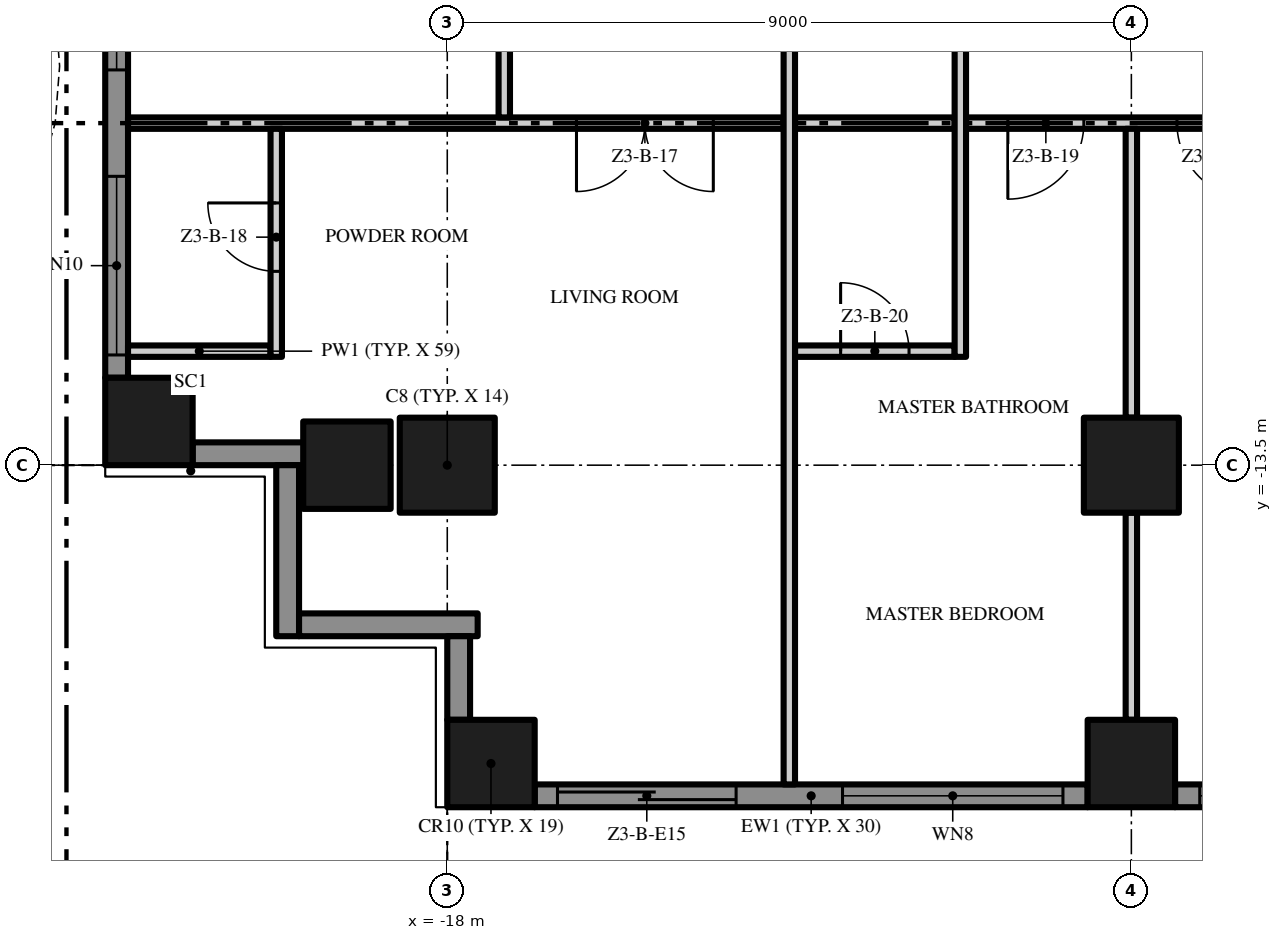
"""IFC4 building model, lengths in metres.
Left out: names, types, materials, properties, quantities, classifications, styles, units other than length and angle.
Written with IfcOpenShell. Run it as: python <this file> out.ifc"""

import sys

from ifc_helpers import new_model, si_unit, direction, frame, frame_2d, origin, origin_2d, place, context, subcontext, project, spatial, polyline, rectangle, outline, extrude, element, fill, save


model = new_model("IFC4")
c1 = context("Model", 3, precision=1e-05, world=origin(), true_north=direction((0.0, 1.0)))
c2 = subcontext(c1, "Body", "Model", "MODEL_VIEW")
j1 = project(units=[si_unit("LENGTHUNIT", "METRE"), si_unit("PLANEANGLEUNIT", "RADIAN")], contexts=[c1])
p1 = place(None, origin())
s1 = spatial("IfcSite", under=j1, at=p1, CompositionType="ELEMENT")
p2 = place(p1, origin())
s2 = spatial("IfcBuilding", under=s1, at=p2, CompositionType="ELEMENT")
p3 = place(p2, frame((0.0, 0.0, 144.0)))
s3 = spatial("IfcBuildingStorey", under=s2, at=p3, CompositionType="ELEMENT", Elevation=144.0)
p4 = place(p3, frame((-18.0, -13.5, 0.0), z_axis=(0.0, 0.0, 1.0), x_axis=(1.0, 0.0, 0.0)))
e1 = element("IfcColumn", 1, at=p4, inside=s3, PredefinedType="COLUMN", context=c2, shape_type="SweptSolid", body=[
    extrude(rectangle(XDim=1.25, YDim=1.25, at=origin_2d()), origin(), (0.0, 0.0, 1.0), 3.5),
])
for number, where, z_axis, x_axis in (
    (2, (-17.425, -17.425, 0.0), (0.0, 0.0, 1.0), (1.0, 0.0, 0.0)),
    (3, (-21.925, -12.925, 0.0), (0.0, 0.0, 1.0), (1.0, 0.0, 0.0)),
    (4, (-19.32, -13.5, 0.0), (0.0, 0.0, 1.0), (1.0, 0.0, 0.0)),
):
    element("IfcColumn", number, at=place(p3, frame(where, z_axis=z_axis, x_axis=x_axis)), inside=s3, PredefinedType="COLUMN", context=c2, shape_type="SweptSolid", body=[
        extrude(rectangle(XDim=1.15, YDim=1.15, at=origin_2d()), origin(), (0.0, 0.0, 1.0), 3.5),
    ])
p5 = place(p3, frame((-9.0, -13.5, 0.0), z_axis=(0.0, 0.0, 1.0), x_axis=(1.0, 0.0, 0.0)))
e5 = element("IfcColumn", 5, at=p5, inside=s3, PredefinedType="COLUMN", context=c2, shape_type="SweptSolid", body=[
    extrude(rectangle(XDim=1.25, YDim=1.25, at=origin_2d()), origin(), (0.0, 0.0, 1.0), 3.5),
])
p6 = place(p3, frame((-9.0, -17.425, 0.0), z_axis=(0.0, 0.0, 1.0), x_axis=(1.0, 0.0, 0.0)))
e6 = element("IfcColumn", 6, at=p6, inside=s3, PredefinedType="COLUMN", context=c2, shape_type="SweptSolid", body=[
    extrude(rectangle(XDim=1.15, YDim=1.15, at=origin_2d()), origin(), (0.0, 0.0, 1.0), 3.5),
])
p7 = place(p3, frame((-9.575, -17.85, 0.0), z_axis=(0.0, 0.0, 1.0), x_axis=(-1.0, 0.0, 0.0)))
e7 = element("IfcWall", 7, at=p7, inside=s3, PredefinedType="SOLIDWALL", context=c2, shape_type="SweptSolid", body=[
    extrude(rectangle(XDim=7.275, YDim=0.3, at=frame_2d((3.638, 0.0))), origin(), (0.0, 0.0, 1.0), 3.5),
])
p8 = place(p7, frame((4.625, 0.0, 0.0)))
e8 = element("IfcOpeningElement", 8, at=p8, cuts=e7, PredefinedType="OPENING", context=c2, shape_type="SweptSolid", body=[
    extrude(rectangle(XDim=2.35, YDim=2.4, at=frame_2d((1.175, 1.2))), frame((0.0, 0.16, 0.0), z_axis=(0.0, -1.0, 0.0), x_axis=(1.0, 0.0, 0.0)), (0.0, 0.0, 1.0), 0.32),
])
p9 = place(p7, frame((0.325, 0.0, 0.45)))
e9 = element("IfcOpeningElement", 9, at=p9, cuts=e7, PredefinedType="OPENING", context=c2, shape_type="SweptSolid", body=[
    extrude(rectangle(XDim=2.9, YDim=2.65, at=frame_2d((1.45, 1.325))), frame((0.0, 0.16, 0.0), z_axis=(0.0, -1.0, 0.0), x_axis=(1.0, 0.0, 0.0)), (0.0, 0.0, 1.0), 0.32),
])
p10 = place(p3, frame((-0.575, -17.85, 0.0), z_axis=(0.0, 0.0, 1.0), x_axis=(-1.0, 0.0, 0.0)))
e10 = element("IfcWall", 10, at=p10, inside=s3, PredefinedType="SOLIDWALL", context=c2, shape_type="SweptSolid", body=[
    extrude(rectangle(XDim=7.85, YDim=0.3, at=frame_2d((3.925, 0.0))), origin(), (0.0, 0.0, 1.0), 3.5),
])
p11 = place(p10, frame((4.625, 0.0, 0.45)))
e11 = element("IfcOpeningElement", 11, at=p11, cuts=e10, PredefinedType="OPENING", context=c2, shape_type="SweptSolid", body=[
    extrude(rectangle(XDim=2.9, YDim=2.65, at=frame_2d((1.45, 1.325))), frame((0.0, 0.16, 0.0), z_axis=(0.0, -1.0, 0.0), x_axis=(1.0, 0.0, 0.0)), (0.0, 0.0, 1.0), 0.32),
])
p12 = place(p10, frame((0.325, 0.0, 0.45)))
e12 = element("IfcOpeningElement", 12, at=p12, cuts=e10, PredefinedType="OPENING", context=c2, shape_type="SweptSolid", body=[
    extrude(rectangle(XDim=2.9, YDim=2.65, at=frame_2d((1.45, 1.325))), frame((0.0, 0.16, 0.0), z_axis=(0.0, -1.0, 0.0), x_axis=(1.0, 0.0, 0.0)), (0.0, 0.0, 1.0), 0.32),
])
p13 = place(p3, frame((-22.35, -12.35, 0.0), z_axis=(0.0, 0.0, 1.0), x_axis=(0.0, 1.0, 0.0)))
e13 = element("IfcWall", 13, at=p13, inside=s3, PredefinedType="SOLIDWALL", context=c2, shape_type="SweptSolid", body=[
    extrude(rectangle(XDim=7.275, YDim=0.3, at=frame_2d((3.638, 0.0))), origin(), (0.0, 0.0, 1.0), 3.5),
])
p14 = place(p13, frame((4.05, 0.0, 0.45)))
e14 = element("IfcOpeningElement", 14, at=p14, cuts=e13, PredefinedType="OPENING", context=c2, shape_type="SweptSolid", body=[
    extrude(rectangle(XDim=2.9, YDim=2.65, at=frame_2d((1.45, 1.325))), frame((0.0, 0.16, 0.0), z_axis=(0.0, -1.0, 0.0), x_axis=(1.0, 0.0, 0.0)), (0.0, 0.0, 1.0), 0.32),
])
p15 = place(p13, frame((0.3, 0.0, 0.45)))
e15 = element("IfcOpeningElement", 15, at=p15, cuts=e13, PredefinedType="OPENING", context=c2, shape_type="SweptSolid", body=[
    extrude(rectangle(XDim=2.35, YDim=2.65, at=frame_2d((1.175, 1.325))), frame((0.0, 0.16, 0.0), z_axis=(0.0, -1.0, 0.0), x_axis=(1.0, 0.0, 0.0)), (0.0, 0.0, 1.0), 0.32),
])
p16 = place(p3, frame((-19.85, -13.35, 0.0), z_axis=(0.0, 0.0, 1.0), x_axis=(-1.0, 0.0, 0.0)))
e16 = element("IfcWall", 16, at=p16, inside=s3, PredefinedType="SOLIDWALL", context=c2, shape_type="SweptSolid", body=[
    extrude(rectangle(XDim=1.5, YDim=0.3, at=frame_2d((0.75, 0.0))), origin(), (0.0, 0.0, 1.0), 3.5),
])
p17 = place(p3, frame((-20.1, -15.75, 0.0), z_axis=(0.0, 0.0, 1.0), x_axis=(0.0, 1.0, 0.0)))
e17 = element("IfcWall", 17, at=p17, inside=s3, PredefinedType="SOLIDWALL", context=c2, shape_type="SweptSolid", body=[
    extrude(rectangle(XDim=2.25, YDim=0.3, at=frame_2d((1.125, 0.0))), origin(), (0.0, 0.0, 1.0), 3.5),
])
p18 = place(p3, frame((-17.6, -15.6, 0.0), z_axis=(0.0, 0.0, 1.0), x_axis=(-1.0, 0.0, 0.0)))
e18 = element("IfcWall", 18, at=p18, inside=s3, PredefinedType="SOLIDWALL", context=c2, shape_type="SweptSolid", body=[
    extrude(rectangle(XDim=2.35, YDim=0.3, at=frame_2d((1.175, 0.0))), origin(), (0.0, 0.0, 1.0), 3.5),
])
p19 = place(p3, frame((-17.85, -16.85, 0.0), z_axis=(0.0, 0.0, 1.0), x_axis=(0.0, 1.0, 0.0)))
e19 = element("IfcWall", 19, at=p19, inside=s3, PredefinedType="SOLIDWALL", context=c2, shape_type="SweptSolid", body=[
    extrude(rectangle(XDim=1.1, YDim=0.3, at=frame_2d((0.55, 0.0))), origin(), (0.0, 0.0, 1.0), 3.5),
])
p20 = place(p3, origin())
e20 = element("IfcWall", 20, at=p20, inside=s3, PredefinedType="USERDEFINED", context=c2, shape_type="SweptSolid", body=[
    extrude(outline(polyline([(-18.0, -19.8), (-16.5, -20.505), (-15.0, -20.941), (-14.25, -21.0), (-13.5, -20.941), (-12.0, -20.505), (-10.5, -19.8), (-9.0, -19.095), (-7.5, -18.659), (-6.75, -18.6), (-6.0, -18.659), (-4.5, -19.095), (-3.0, -19.8), (-1.5, -20.505), (0.0, -20.941), (0.75, -21.0), (1.5, -20.941), (3.0, -20.505), (4.5, -19.8), (6.0, -19.095), (7.5, -18.659), (8.25, -18.6), (9.0, -18.659), (10.5, -19.095), (12.0, -19.8), (13.5, -20.505), (15.0, -20.941), (15.75, -21.0), (16.5, -20.941), (18.0, -20.505), (17.93, -20.265), (16.455, -20.694), (15.75, -20.749), (15.045, -20.694), (13.589, -20.271), (12.106, -19.574), (10.589, -18.86), (9.045, -18.411), (8.25, -18.349), (7.455, -18.411), (5.911, -18.86), (4.394, -19.574), (2.911, -20.271), (1.455, -20.694), (0.75, -20.749), (0.045, -20.694), (-1.411, -20.271), (-2.894, -19.574), (-4.411, -18.86), (-5.955, -18.411), (-6.75, -18.349), (-7.545, -18.411), (-9.089, -18.86), (-10.606, -19.574), (-12.089, -20.271), (-13.545, -20.694), (-14.25, -20.749), (-14.955, -20.694), (-16.411, -20.271), (-17.894, -19.574), (-18.0, -19.8)])), origin(), (0.0, 0.0, 1.0), 0.9),
])
p21 = place(p3, origin())
e21 = element("IfcWall", 21, at=p21, inside=s3, PredefinedType="USERDEFINED", context=c2, shape_type="SweptSolid", body=[
    extrude(outline(polyline([(-24.3, 18.0), (-25.005, 16.5), (-25.441, 15.0), (-25.5, 14.25), (-25.441, 13.5), (-25.005, 12.0), (-24.3, 10.5), (-23.595, 9.0), (-23.159, 7.5), (-23.1, 6.75), (-23.159, 6.0), (-23.595, 4.5), (-24.3, 3.0), (-25.005, 1.5), (-25.441, 0.0), (-25.5, -0.75), (-25.441, -1.5), (-25.005, -3.0), (-24.3, -4.5), (-23.595, -6.0), (-23.159, -7.5), (-23.1, -8.25), (-23.159, -9.0), (-23.595, -10.5), (-24.3, -12.0), (-25.005, -13.5), (-24.779, -13.606), (-24.074, -12.106), (-23.36, -10.589), (-22.911, -9.045), (-22.849, -8.25), (-22.911, -7.455), (-23.36, -5.911), (-24.074, -4.394), (-24.771, -2.911), (-25.194, -1.455), (-25.249, -0.75), (-25.194, -0.045), (-24.771, 1.411), (-24.074, 2.894), (-23.36, 4.411), (-22.911, 5.955), (-22.849, 6.75), (-22.911, 7.545), (-23.36, 9.089), (-24.074, 10.606), (-24.771, 12.089), (-25.194, 13.545), (-25.249, 14.25), (-25.194, 14.955), (-24.771, 16.411), (-24.074, 17.894), (-24.3, 18.0)])), origin(), (0.0, 0.0, 1.0), 0.9),
])
p22 = place(p3, frame((-22.2, -12.0, 0.0), z_axis=(0.0, 0.0, 1.0), x_axis=(1.0, 0.0, 0.0)))
e22 = element("IfcWall", 22, at=p22, inside=s3, PredefinedType="PARTITIONING", context=c2, shape_type="SweptSolid", body=[
    extrude(rectangle(XDim=1.875, YDim=0.15, at=frame_2d((0.938, 0.0))), origin(), (0.0, 0.0, 1.0), 3.5),
])
p23 = place(p3, frame((-13.425, -12.0, 0.0), z_axis=(0.0, 0.0, 1.0), x_axis=(1.0, 0.0, 0.0)))
e23 = element("IfcWall", 23, at=p23, inside=s3, PredefinedType="PARTITIONING", context=c2, shape_type="SweptSolid", body=[
    extrude(rectangle(XDim=2.1, YDim=0.15, at=frame_2d((1.05, 0.0))), origin(), (0.0, 0.0, 1.0), 3.5),
])
p24 = place(p23, frame((0.6, 0.0, 0.0)))
e24 = element("IfcOpeningElement", 24, at=p24, cuts=e23, PredefinedType="OPENING", context=c2, shape_type="SweptSolid", body=[
    extrude(rectangle(XDim=0.9, YDim=2.1, at=frame_2d((0.45, 1.05))), frame((0.0, 0.085, 0.0), z_axis=(0.0, -1.0, 0.0), x_axis=(1.0, 0.0, 0.0)), (0.0, 0.0, 1.0), 0.17),
])
p25 = place(p3, frame((-13.575, -9.0, 0.0), z_axis=(0.0, 0.0, 1.0), x_axis=(-1.0, 0.0, 0.0)))
e25 = element("IfcWall", 25, at=p25, inside=s3, PredefinedType="PARTITIONING", context=c2, shape_type="SweptSolid", body=[
    extrude(rectangle(XDim=8.625, YDim=0.15, at=frame_2d((4.312, 0.0))), origin(), (0.0, 0.0, 1.0), 3.5),
])
p26 = place(p25, frame((0.925, 0.0, 0.0)))
e26 = element("IfcOpeningElement", 26, at=p26, cuts=e25, PredefinedType="OPENING", context=c2, shape_type="SweptSolid", body=[
    extrude(rectangle(XDim=1.8, YDim=2.4, at=frame_2d((0.9, 1.2))), frame((0.0, 0.085, 0.0), z_axis=(0.0, -1.0, 0.0), x_axis=(1.0, 0.0, 0.0)), (0.0, 0.0, 1.0), 0.17),
])
p27 = place(p3, frame((-13.425, -9.0, 0.0), z_axis=(0.0, 0.0, 1.0), x_axis=(1.0, 0.0, 0.0)))
e27 = element("IfcWall", 27, at=p27, inside=s3, PredefinedType="PARTITIONING", context=c2, shape_type="SweptSolid", body=[
    extrude(rectangle(XDim=2.1, YDim=0.15, at=frame_2d((1.05, 0.0))), origin(), (0.0, 0.0, 1.0), 3.5),
])
p28 = place(p3, frame((-6.825, -9.0, 0.0), z_axis=(0.0, 0.0, 1.0), x_axis=(-1.0, 0.0, 0.0)))
e28 = element("IfcWall", 28, at=p28, inside=s3, PredefinedType="PARTITIONING", context=c2, shape_type="SweptSolid", body=[
    extrude(rectangle(XDim=4.35, YDim=0.15, at=frame_2d((2.175, 0.0))), origin(), (0.0, 0.0, 1.0), 3.5),
])
p29 = place(p28, frame((2.8, 0.0, 0.0)))
e29 = element("IfcOpeningElement", 29, at=p29, cuts=e28, PredefinedType="OPENING", context=c2, shape_type="SweptSolid", body=[
    extrude(rectangle(XDim=1.0, YDim=2.4, at=frame_2d((0.5, 1.2))), frame((0.0, 0.085, 0.0), z_axis=(0.0, -1.0, 0.0), x_axis=(1.0, 0.0, 0.0)), (0.0, 0.0, 1.0), 0.17),
])
p30 = place(p28, frame((0.575, 0.0, 0.0)))
e30 = element("IfcOpeningElement", 30, at=p30, cuts=e28, PredefinedType="OPENING", context=c2, shape_type="SweptSolid", body=[
    extrude(rectangle(XDim=1.0, YDim=2.4, at=frame_2d((0.5, 1.2))), frame((0.0, 0.085, 0.0), z_axis=(0.0, -1.0, 0.0), x_axis=(1.0, 0.0, 0.0)), (0.0, 0.0, 1.0), 0.17),
])
p31 = place(p3, frame((-20.25, -12.075, 0.0), z_axis=(0.0, 0.0, 1.0), x_axis=(0.0, 1.0, 0.0)))
e31 = element("IfcWall", 31, at=p31, inside=s3, PredefinedType="PARTITIONING", context=c2, shape_type="SweptSolid", body=[
    extrude(rectangle(XDim=3.0, YDim=0.15, at=frame_2d((1.5, 0.0))), origin(), (0.0, 0.0, 1.0), 3.5),
])
p32 = place(p31, frame((1.125, 0.0, 0.0)))
e32 = element("IfcOpeningElement", 32, at=p32, cuts=e31, PredefinedType="OPENING", context=c2, shape_type="SweptSolid", body=[
    extrude(rectangle(XDim=0.9, YDim=2.1, at=frame_2d((0.45, 1.05))), frame((0.0, 0.085, 0.0), z_axis=(0.0, -1.0, 0.0), x_axis=(1.0, 0.0, 0.0)), (0.0, 0.0, 1.0), 0.17),
])
p33 = place(p3, frame((-17.25, -8.925, 0.0), z_axis=(0.0, 0.0, 1.0), x_axis=(0.0, 1.0, 0.0)))
e33 = element("IfcWall", 33, at=p33, inside=s3, PredefinedType="PARTITIONING", context=c2, shape_type="SweptSolid", body=[
    extrude(rectangle(XDim=4.5, YDim=0.15, at=frame_2d((2.25, 0.0))), origin(), (0.0, 0.0, 1.0), 3.5),
])
p34 = place(p3, frame((-13.5, -4.425, 0.0), z_axis=(0.0, 0.0, 1.0), x_axis=(0.0, -1.0, 0.0)))
e34 = element("IfcWall", 34, at=p34, inside=s3, PredefinedType="PARTITIONING", context=c2, shape_type="SweptSolid", body=[
    extrude(rectangle(XDim=13.275, YDim=0.15, at=frame_2d((6.638, 0.0))), origin(), (0.0, 0.0, 1.0), 3.5),
])
p35 = place(p34, frame((1.875, 0.0, 0.0)))
e35 = element("IfcOpeningElement", 35, at=p35, cuts=e34, PredefinedType="OPENING", context=c2, shape_type="SweptSolid", body=[
    extrude(rectangle(XDim=0.9, YDim=2.1, at=frame_2d((0.45, 1.05))), frame((0.0, 0.085, 0.0), z_axis=(0.0, -1.0, 0.0), x_axis=(1.0, 0.0, 0.0)), (0.0, 0.0, 1.0), 0.17),
])
p36 = place(p3, frame((-11.25, -12.075, 0.0), z_axis=(0.0, 0.0, 1.0), x_axis=(0.0, 1.0, 0.0)))
e36 = element("IfcWall", 36, at=p36, inside=s3, PredefinedType="PARTITIONING", context=c2, shape_type="SweptSolid", body=[
    extrude(rectangle(XDim=7.65, YDim=0.15, at=frame_2d((3.825, 0.0))), origin(), (0.0, 0.0, 1.0), 3.5),
])
p37 = place(p3, frame((-9.0, -16.85, 0.0), z_axis=(0.0, 0.0, 1.0), x_axis=(0.0, 1.0, 0.0)))
e37 = element("IfcWall", 37, at=p37, inside=s3, PredefinedType="PARTITIONING", context=c2, shape_type="SweptSolid", body=[
    extrude(rectangle(XDim=2.725, YDim=0.15, at=frame_2d((1.363, 0.0))), origin(), (0.0, 0.0, 1.0), 3.5),
])
p38 = place(p3, frame((-9.0, -12.875, 0.0), z_axis=(0.0, 0.0, 1.0), x_axis=(0.0, 1.0, 0.0)))
e38 = element("IfcWall", 38, at=p38, inside=s3, PredefinedType="PARTITIONING", context=c2, shape_type="SweptSolid", body=[
    extrude(rectangle(XDim=3.8, YDim=0.15, at=frame_2d((1.9, 0.0))), origin(), (0.0, 0.0, 1.0), 3.5),
])
p39 = place(p8, origin())
e39 = element("IfcDoor", 39, at=p39, inside=s3, OperationType="SINGLE_SWING_LEFT", PredefinedType="DOOR", context=c2, shape_type="SweptSolid", body=[
    extrude(rectangle(XDim=2.35, YDim=2.4, at=frame_2d((1.175, 1.2))), frame((0.0, 0.025, 0.0), z_axis=(0.0, -1.0, 0.0), x_axis=(1.0, 0.0, 0.0)), (0.0, 0.0, 1.0), 0.05),
])
fill(e8, e39)
p40 = place(p9, origin())
e40 = element("IfcWindow", 40, at=p40, inside=s3, PartitioningType="SINGLE_PANEL", PredefinedType="WINDOW", context=c2, shape_type="SweptSolid", body=[
    extrude(rectangle(XDim=2.9, YDim=2.65, at=frame_2d((1.45, 1.325))), frame((0.0, 0.03, 0.0), z_axis=(0.0, -1.0, 0.0), x_axis=(1.0, 0.0, 0.0)), (0.0, 0.0, 1.0), 0.06),
])
fill(e9, e40)
p41 = place(p11, origin())
e41 = element("IfcWindow", 41, at=p41, inside=s3, PartitioningType="SINGLE_PANEL", PredefinedType="WINDOW", context=c2, shape_type="SweptSolid", body=[
    extrude(rectangle(XDim=2.9, YDim=2.65, at=frame_2d((1.45, 1.325))), frame((0.0, 0.03, 0.0), z_axis=(0.0, -1.0, 0.0), x_axis=(1.0, 0.0, 0.0)), (0.0, 0.0, 1.0), 0.06),
])
fill(e11, e41)
p42 = place(p14, origin())
e42 = element("IfcWindow", 42, at=p42, inside=s3, PartitioningType="SINGLE_PANEL", PredefinedType="WINDOW", context=c2, shape_type="SweptSolid", body=[
    extrude(rectangle(XDim=2.9, YDim=2.65, at=frame_2d((1.45, 1.325))), frame((0.0, 0.03, 0.0), z_axis=(0.0, -1.0, 0.0), x_axis=(1.0, 0.0, 0.0)), (0.0, 0.0, 1.0), 0.06),
])
fill(e14, e42)
p43 = place(p15, origin())
e43 = element("IfcWindow", 43, at=p43, inside=s3, PartitioningType="SINGLE_PANEL", PredefinedType="WINDOW", context=c2, shape_type="SweptSolid", body=[
    extrude(rectangle(XDim=2.35, YDim=2.65, at=frame_2d((1.175, 1.325))), frame((0.0, 0.03, 0.0), z_axis=(0.0, -1.0, 0.0), x_axis=(1.0, 0.0, 0.0)), (0.0, 0.0, 1.0), 0.06),
])
fill(e15, e43)
p44 = place(p26, origin())
e44 = element("IfcDoor", 44, at=p44, inside=s3, OperationType="DOUBLE_DOOR_SINGLE_SWING", PredefinedType="DOOR", context=c2, shape_type="SweptSolid", body=[
    extrude(rectangle(XDim=1.8, YDim=2.4, at=frame_2d((0.9, 1.2))), frame((0.0, 0.025, 0.0), z_axis=(0.0, -1.0, 0.0), x_axis=(1.0, 0.0, 0.0)), (0.0, 0.0, 1.0), 0.05),
])
fill(e26, e44)
p45 = place(p32, origin())
e45 = element("IfcDoor", 45, at=p45, inside=s3, OperationType="SINGLE_SWING_RIGHT", PredefinedType="DOOR", context=c2, shape_type="SweptSolid", body=[
    extrude(rectangle(XDim=0.9, YDim=2.1, at=frame_2d((0.45, 1.05))), frame((0.0, 0.025, 0.0), z_axis=(0.0, -1.0, 0.0), x_axis=(1.0, 0.0, 0.0)), (0.0, 0.0, 1.0), 0.05),
])
fill(e32, e45)
p46 = place(p29, origin())
e46 = element("IfcDoor", 46, at=p46, inside=s3, OperationType="SINGLE_SWING_RIGHT", PredefinedType="DOOR", context=c2, shape_type="SweptSolid", body=[
    extrude(rectangle(XDim=1.0, YDim=2.4, at=frame_2d((0.5, 1.2))), frame((0.0, 0.025, 0.0), z_axis=(0.0, -1.0, 0.0), x_axis=(1.0, 0.0, 0.0)), (0.0, 0.0, 1.0), 0.05),
])
fill(e29, e46)
p47 = place(p24, origin())
e47 = element("IfcDoor", 47, at=p47, inside=s3, OperationType="SINGLE_SWING_LEFT", PredefinedType="DOOR", context=c2, shape_type="SweptSolid", body=[
    extrude(rectangle(XDim=0.9, YDim=2.1, at=frame_2d((0.45, 1.05))), frame((0.0, 0.025, 0.0), z_axis=(0.0, -1.0, 0.0), x_axis=(1.0, 0.0, 0.0)), (0.0, 0.0, 1.0), 0.05),
])
fill(e24, e47)
p48 = place(p30, origin())
e48 = element("IfcDoor", 48, at=p48, inside=s3, OperationType="SINGLE_SWING_LEFT", PredefinedType="DOOR", context=c2, shape_type="SweptSolid", body=[
    extrude(rectangle(XDim=1.0, YDim=2.4, at=frame_2d((0.5, 1.2))), frame((0.0, 0.025, 0.0), z_axis=(0.0, -1.0, 0.0), x_axis=(1.0, 0.0, 0.0)), (0.0, 0.0, 1.0), 0.05),
])
fill(e30, e48)
save(model, sys.argv[1])
